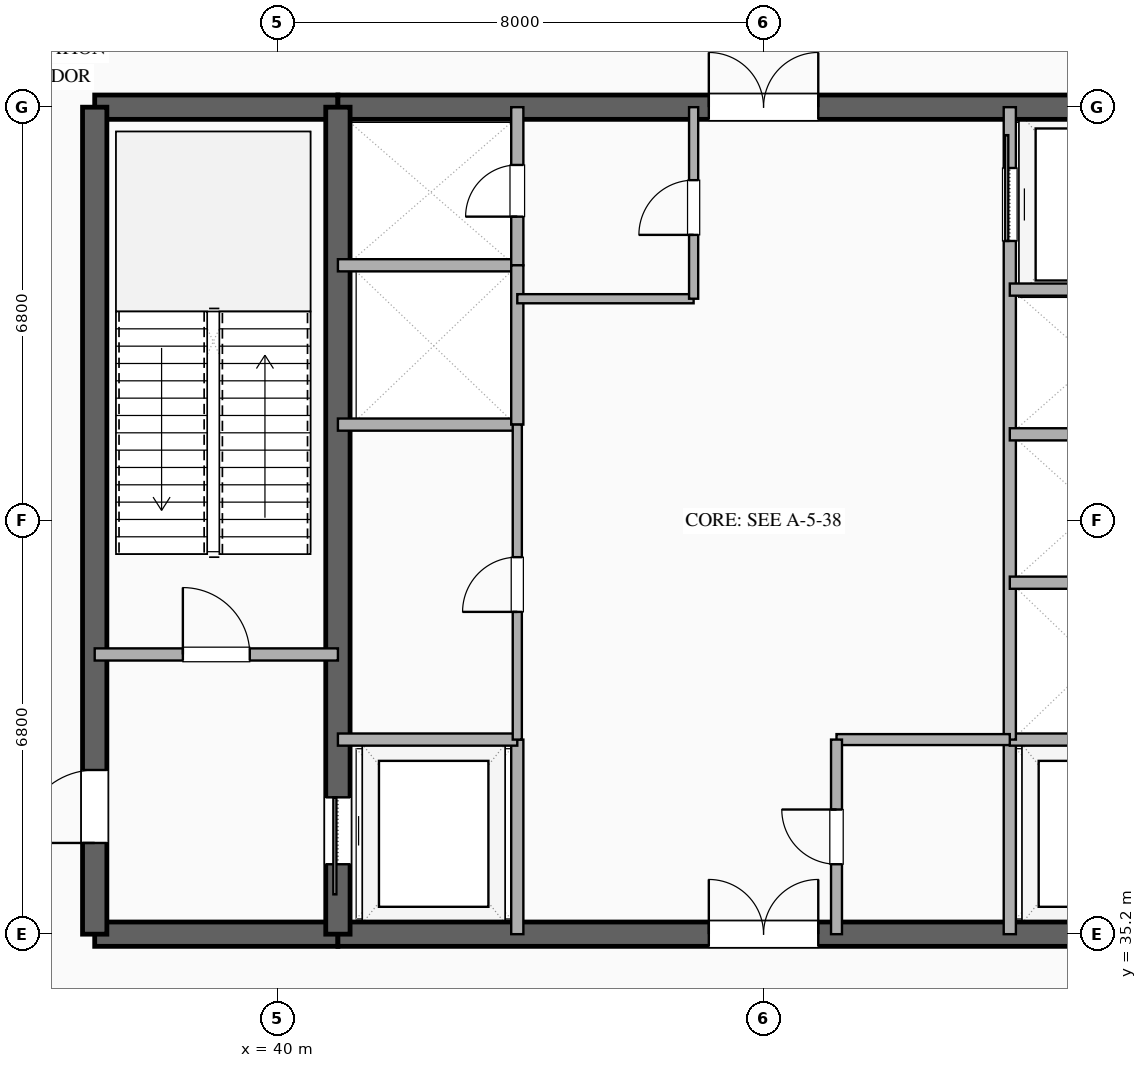
"""IFC4 building model, lengths in metres.
Left out: names, types, materials, properties, quantities, classifications, styles, units other than length and angle.
Written with IfcOpenShell. Run it as: python <this file> out.ifc"""

import sys

from ifc_helpers import new_model, si_unit, direction, frame, frame_2d, origin, place, context, subcontext, project, spatial, rectangle, extrude, element, fill, save


model = new_model("IFC4")
c1 = context("Model", 3, precision=1e-05, world=origin(), true_north=direction((0.0, 1.0)))
c2 = subcontext(c1, "Body", "Model", "MODEL_VIEW")
j1 = project(units=[si_unit("LENGTHUNIT", "METRE"), si_unit("PLANEANGLEUNIT", "RADIAN")], contexts=[c1])
p1 = place(None, origin())
s1 = spatial("IfcSite", under=j1, at=p1, CompositionType="ELEMENT")
p2 = place(p1, origin())
s2 = spatial("IfcBuilding", under=s1, at=p2, CompositionType="ELEMENT")
p3 = place(p2, frame((0.0, 0.0, 256.8)))
s3 = spatial("IfcBuildingStorey", under=s2, at=p3, CompositionType="ELEMENT", Elevation=256.8)
p4 = place(p3, frame((37.0, 35.2, 0.0), z_axis=(0.0, 0.0, 1.0), x_axis=(1.0, 0.0, 0.0)))
e1 = element("IfcWall", 1, at=p4, inside=s3, PredefinedType="SHEAR", context=c2, shape_type="SweptSolid", body=[
    extrude(rectangle(XDim=4.0, YDim=0.4, at=frame_2d((2.0, 0.0))), origin(), (0.0, 0.0, 1.0), 5.17),
])
p5 = place(p3, frame((41.0, 35.2, 0.0), z_axis=(0.0, 0.0, 1.0), x_axis=(1.0, 0.0, 0.0)))
e2 = element("IfcWall", 2, at=p5, inside=s3, PredefinedType="SHEAR", context=c2, shape_type="SweptSolid", body=[
    extrude(rectangle(XDim=14.0, YDim=0.4, at=frame_2d((7.0, 0.0))), origin(), (0.0, 0.0, 1.0), 5.17),
])
p6 = place(p5, frame((6.1, 0.0, 0.0)))
e3 = element("IfcOpeningElement", 3, at=p6, cuts=e2, PredefinedType="OPENING", context=c2, shape_type="SweptSolid", body=[
    extrude(rectangle(XDim=1.8, YDim=2.25, at=frame_2d((0.9, 1.125))), frame((0.0, 0.21, 0.0), z_axis=(0.0, -1.0, 0.0), x_axis=(1.0, 0.0, 0.0)), (0.0, 0.0, 1.0), 0.42),
])
p7 = place(p3, frame((37.0, 48.8, 0.0), z_axis=(0.0, 0.0, 1.0), x_axis=(1.0, 0.0, 0.0)))
e4 = element("IfcWall", 4, at=p7, inside=s3, PredefinedType="SHEAR", context=c2, shape_type="SweptSolid", body=[
    extrude(rectangle(XDim=4.0, YDim=0.4, at=frame_2d((2.0, 0.0))), origin(), (0.0, 0.0, 1.0), 5.17),
])
p8 = place(p3, frame((41.0, 48.8, 0.0), z_axis=(0.0, 0.0, 1.0), x_axis=(1.0, 0.0, 0.0)))
e5 = element("IfcWall", 5, at=p8, inside=s3, PredefinedType="SHEAR", context=c2, shape_type="SweptSolid", body=[
    extrude(rectangle(XDim=14.0, YDim=0.4, at=frame_2d((7.0, 0.0))), origin(), (0.0, 0.0, 1.0), 5.17),
])
p9 = place(p8, frame((6.1, 0.0, 0.0)))
e6 = element("IfcOpeningElement", 6, at=p9, cuts=e5, PredefinedType="OPENING", context=c2, shape_type="SweptSolid", body=[
    extrude(rectangle(XDim=1.8, YDim=2.25, at=frame_2d((0.9, 1.125))), frame((0.0, 0.21, 0.0), z_axis=(0.0, -1.0, 0.0), x_axis=(1.0, 0.0, 0.0)), (0.0, 0.0, 1.0), 0.42),
])
p10 = place(p3, frame((37.0, 35.2, 0.0), z_axis=(0.0, 0.0, 1.0), x_axis=(0.0, 1.0, 0.0)))
e7 = element("IfcWall", 7, at=p10, inside=s3, PredefinedType="SHEAR", context=c2, shape_type="SweptSolid", body=[
    extrude(rectangle(XDim=13.6, YDim=0.4, at=frame_2d((6.8, 0.0))), origin(), (0.0, 0.0, 1.0), 5.17),
])
p11 = place(p10, frame((1.5, 0.0, 0.0)))
e8 = element("IfcOpeningElement", 8, at=p11, cuts=e7, PredefinedType="OPENING", context=c2, shape_type="SweptSolid", body=[
    extrude(rectangle(XDim=1.2, YDim=2.15, at=frame_2d((0.6, 1.075))), frame((0.0, 0.21, 0.0), z_axis=(0.0, -1.0, 0.0), x_axis=(1.0, 0.0, 0.0)), (0.0, 0.0, 1.0), 0.42),
])
p12 = place(p3, frame((41.0, 35.2, 0.0), z_axis=(0.0, 0.0, 1.0), x_axis=(0.0, 1.0, 0.0)))
e9 = element("IfcWall", 9, at=p12, inside=s3, PredefinedType="SHEAR", context=c2, shape_type="SweptSolid", body=[
    extrude(rectangle(XDim=13.6, YDim=0.4, at=frame_2d((6.8, 0.0))), origin(), (0.0, 0.0, 1.0), 5.17),
])
p13 = place(p12, frame((1.15, 0.0, 0.0)))
e10 = element("IfcOpeningElement", 10, at=p13, cuts=e9, PredefinedType="OPENING", context=c2, shape_type="SweptSolid", body=[
    extrude(rectangle(XDim=1.1, YDim=2.2, at=frame_2d((0.55, 1.1))), frame((0.0, 0.21, 0.0), z_axis=(0.0, -1.0, 0.0), x_axis=(1.0, 0.0, 0.0)), (0.0, 0.0, 1.0), 0.42),
])
p14 = place(p3, frame((37.0, 39.8, 0.0), z_axis=(0.0, 0.0, 1.0), x_axis=(1.0, 0.0, 0.0)))
e11 = element("IfcWall", 11, at=p14, inside=s3, PredefinedType="SOLIDWALL", context=c2, shape_type="SweptSolid", body=[
    extrude(rectangle(XDim=4.0, YDim=0.2, at=frame_2d((2.0, 0.0))), origin(), (0.0, 0.0, 1.0), 3.47),
])
p15 = place(p14, frame((1.45, 0.0, 0.0)))
e12 = element("IfcOpeningElement", 12, at=p15, cuts=e11, PredefinedType="OPENING", context=c2, shape_type="SweptSolid", body=[
    extrude(rectangle(XDim=1.1, YDim=2.15, at=frame_2d((0.55, 1.075))), frame((0.0, 0.11, 0.0), z_axis=(0.0, -1.0, 0.0), x_axis=(1.0, 0.0, 0.0)), (0.0, 0.0, 1.0), 0.22),
])
p16 = place(p3, frame((43.95, 35.2, 0.0), z_axis=(0.0, 0.0, 1.0), x_axis=(0.0, 1.0, 0.0)))
e13 = element("IfcWall", 13, at=p16, inside=s3, PredefinedType="SOLIDWALL", context=c2, shape_type="SweptSolid", body=[
    extrude(rectangle(XDim=3.2, YDim=0.2, at=frame_2d((1.6, 0.0))), origin(), (0.0, 0.0, 1.0), 3.47),
])
p17 = place(p3, frame((41.0, 38.4, 0.0), z_axis=(0.0, 0.0, 1.0), x_axis=(1.0, 0.0, 0.0)))
e14 = element("IfcWall", 14, at=p17, inside=s3, PredefinedType="SOLIDWALL", context=c2, shape_type="SweptSolid", body=[
    extrude(rectangle(XDim=2.95, YDim=0.2, at=frame_2d((1.475, 0.0))), origin(), (0.0, 0.0, 1.0), 3.47),
])
p18 = place(p3, frame((52.05, 35.2, 0.0), z_axis=(0.0, 0.0, 1.0), x_axis=(0.0, 1.0, 0.0)))
e15 = element("IfcWall", 15, at=p18, inside=s3, PredefinedType="SOLIDWALL", context=c2, shape_type="SweptSolid", body=[
    extrude(rectangle(XDim=3.2, YDim=0.2, at=frame_2d((1.6, 0.0))), origin(), (0.0, 0.0, 1.0), 3.47),
])
for number, where, z_axis, x_axis in (
    (16, (52.05, 38.4, 0.0), (0.0, 0.0, 1.0), (1.0, 0.0, 0.0)),
    (17, (41.0, 46.2, 0.0), (0.0, 0.0, 1.0), (1.0, 0.0, 0.0)),
):
    element("IfcWall", number, at=place(p3, frame(where, z_axis=z_axis, x_axis=x_axis)), inside=s3, PredefinedType="SOLIDWALL", context=c2, shape_type="SweptSolid", body=[
        extrude(rectangle(XDim=2.95, YDim=0.2, at=frame_2d((1.475, 0.0))), origin(), (0.0, 0.0, 1.0), 3.47),
    ])
p19 = place(p3, frame((43.95, 46.2, 0.0), z_axis=(0.0, 0.0, 1.0), x_axis=(0.0, 1.0, 0.0)))
e18 = element("IfcWall", 18, at=p19, inside=s3, PredefinedType="SOLIDWALL", context=c2, shape_type="SweptSolid", body=[
    extrude(rectangle(XDim=2.6, YDim=0.2, at=frame_2d((1.3, 0.0))), origin(), (0.0, 0.0, 1.0), 3.47),
])
p20 = place(p19, frame((0.8, 0.0, 0.0)))
e19 = element("IfcOpeningElement", 19, at=p20, cuts=e18, PredefinedType="OPENING", context=c2, shape_type="SweptSolid", body=[
    extrude(rectangle(XDim=0.85, YDim=2.15, at=frame_2d((0.425, 1.075))), frame((0.0, 0.11, 0.0), z_axis=(0.0, -1.0, 0.0), x_axis=(1.0, 0.0, 0.0)), (0.0, 0.0, 1.0), 0.22),
])
p21 = place(p3, frame((41.0, 43.58, 0.0), z_axis=(0.0, 0.0, 1.0), x_axis=(1.0, 0.0, 0.0)))
e20 = element("IfcWall", 20, at=p21, inside=s3, PredefinedType="SOLIDWALL", context=c2, shape_type="SweptSolid", body=[
    extrude(rectangle(XDim=2.95, YDim=0.2, at=frame_2d((1.475, 0.0))), origin(), (0.0, 0.0, 1.0), 3.47),
])
p22 = place(p3, frame((43.95, 43.58, 0.0), z_axis=(0.0, 0.0, 1.0), x_axis=(0.0, 1.0, 0.0)))
e21 = element("IfcWall", 21, at=p22, inside=s3, PredefinedType="SOLIDWALL", context=c2, shape_type="SweptSolid", body=[
    extrude(rectangle(XDim=2.62, YDim=0.2, at=frame_2d((1.31, 0.0))), origin(), (0.0, 0.0, 1.0), 3.47),
])
p23 = place(p3, frame((43.95, 38.4, 0.0), z_axis=(0.0, 0.0, 1.0), x_axis=(0.0, 1.0, 0.0)))
e22 = element("IfcWall", 22, at=p23, inside=s3, PredefinedType="PARTITIONING", context=c2, shape_type="SweptSolid", body=[
    extrude(rectangle(XDim=5.18, YDim=0.15, at=frame_2d((2.59, 0.0))), origin(), (0.0, 0.0, 1.0), 3.47),
])
p24 = place(p23, frame((2.1, 0.0, 0.0)))
e23 = element("IfcOpeningElement", 23, at=p24, cuts=e22, PredefinedType="OPENING", context=c2, shape_type="SweptSolid", body=[
    extrude(rectangle(XDim=0.9, YDim=2.15, at=frame_2d((0.45, 1.075))), frame((0.0, 0.085, 0.0), z_axis=(0.0, -1.0, 0.0), x_axis=(1.0, 0.0, 0.0)), (0.0, 0.0, 1.0), 0.17),
])
p25 = place(p3, frame((52.05, 38.4, 0.0), z_axis=(0.0, 0.0, 1.0), x_axis=(0.0, 1.0, 0.0)))
e24 = element("IfcWall", 24, at=p25, inside=s3, PredefinedType="SOLIDWALL", context=c2, shape_type="SweptSolid", body=[
    extrude(rectangle(XDim=10.4, YDim=0.2, at=frame_2d((5.2, 0.0))), origin(), (0.0, 0.0, 1.0), 3.47),
])
p26 = place(p25, frame((8.2, 0.0, 0.0)))
e25 = element("IfcOpeningElement", 25, at=p26, cuts=e24, PredefinedType="OPENING", context=c2, shape_type="SweptSolid", body=[
    extrude(rectangle(XDim=1.2, YDim=2.2, at=frame_2d((0.6, 1.1))), frame((0.0, 0.11, 0.0), z_axis=(0.0, -1.0, 0.0), x_axis=(1.0, 0.0, 0.0)), (0.0, 0.0, 1.0), 0.22),
])
for number, where, z_axis, x_axis in (
    (26, (52.05, 40.98, 0.0), (0.0, 0.0, 1.0), (1.0, 0.0, 0.0)),
    (27, (52.05, 43.42, 0.0), (0.0, 0.0, 1.0), (1.0, 0.0, 0.0)),
    (28, (52.05, 45.8, 0.0), (0.0, 0.0, 1.0), (1.0, 0.0, 0.0)),
):
    element("IfcWall", number, at=place(p3, frame(where, z_axis=z_axis, x_axis=x_axis)), inside=s3, PredefinedType="SOLIDWALL", context=c2, shape_type="SweptSolid", body=[
        extrude(rectangle(XDim=2.95, YDim=0.2, at=frame_2d((1.475, 0.0))), origin(), (0.0, 0.0, 1.0), 3.47),
    ])
p27 = place(p3, frame((43.95, 45.65, 0.0), z_axis=(0.0, 0.0, 1.0), x_axis=(1.0, 0.0, 0.0)))
e29 = element("IfcWall", 29, at=p27, inside=s3, PredefinedType="PARTITIONING", context=c2, shape_type="SweptSolid", body=[
    extrude(rectangle(XDim=2.9, YDim=0.15, at=frame_2d((1.45, 0.0))), origin(), (0.0, 0.0, 1.0), 3.47),
])
p28 = place(p3, frame((46.85, 45.65, 0.0), z_axis=(0.0, 0.0, 1.0), x_axis=(0.0, 1.0, 0.0)))
e30 = element("IfcWall", 30, at=p28, inside=s3, PredefinedType="PARTITIONING", context=c2, shape_type="SweptSolid", body=[
    extrude(rectangle(XDim=3.15, YDim=0.15, at=frame_2d((1.575, 0.0))), origin(), (0.0, 0.0, 1.0), 3.47),
])
p29 = place(p28, frame((1.05, 0.0, 0.0)))
e31 = element("IfcOpeningElement", 31, at=p29, cuts=e30, PredefinedType="OPENING", context=c2, shape_type="SweptSolid", body=[
    extrude(rectangle(XDim=0.9, YDim=2.15, at=frame_2d((0.45, 1.075))), frame((0.0, 0.085, 0.0), z_axis=(0.0, -1.0, 0.0), x_axis=(1.0, 0.0, 0.0)), (0.0, 0.0, 1.0), 0.17),
])
p30 = place(p3, frame((49.2, 38.4, 0.0), z_axis=(0.0, 0.0, 1.0), x_axis=(1.0, 0.0, 0.0)))
e32 = element("IfcWall", 32, at=p30, inside=s3, PredefinedType="PLUMBINGWALL", context=c2, shape_type="SweptSolid", body=[
    extrude(rectangle(XDim=2.85, YDim=0.18, at=frame_2d((1.425, 0.0))), origin(), (0.0, 0.0, 1.0), 3.47),
])
p31 = place(p3, frame((49.2, 35.2, 0.0), z_axis=(0.0, 0.0, 1.0), x_axis=(0.0, 1.0, 0.0)))
e33 = element("IfcWall", 33, at=p31, inside=s3, PredefinedType="PLUMBINGWALL", context=c2, shape_type="SweptSolid", body=[
    extrude(rectangle(XDim=3.2, YDim=0.18, at=frame_2d((1.6, 0.0))), origin(), (0.0, 0.0, 1.0), 3.47),
])
p32 = place(p31, frame((1.15, 0.0, 0.0)))
e34 = element("IfcOpeningElement", 34, at=p32, cuts=e33, PredefinedType="OPENING", context=c2, shape_type="SweptSolid", body=[
    extrude(rectangle(XDim=0.9, YDim=2.1, at=frame_2d((0.45, 1.05))), frame((0.0, 0.1, 0.0), z_axis=(0.0, -1.0, 0.0), x_axis=(1.0, 0.0, 0.0)), (0.0, 0.0, 1.0), 0.2),
])
p33 = place(p13, origin())
e35 = element("IfcDoor", 35, at=p33, inside=s3, OperationType="SLIDING_TO_LEFT", PredefinedType="DOOR", context=c2, shape_type="SweptSolid", body=[
    extrude(rectangle(XDim=1.1, YDim=2.2, at=frame_2d((0.55, 1.1))), frame((0.0, 0.025, 0.0), z_axis=(0.0, -1.0, 0.0), x_axis=(1.0, 0.0, 0.0)), (0.0, 0.0, 1.0), 0.05),
])
fill(e10, e35)
p34 = place(p11, origin())
e36 = element("IfcDoor", 36, at=p34, inside=s3, OperationType="SINGLE_SWING_LEFT", PredefinedType="DOOR", context=c2, shape_type="SweptSolid", body=[
    extrude(rectangle(XDim=1.2, YDim=2.15, at=frame_2d((0.6, 1.075))), frame((0.0, 0.025, 0.0), z_axis=(0.0, -1.0, 0.0), x_axis=(1.0, 0.0, 0.0)), (0.0, 0.0, 1.0), 0.05),
])
fill(e8, e36)
p35 = place(p6, origin())
e37 = element("IfcDoor", 37, at=p35, inside=s3, OperationType="DOUBLE_DOOR_SINGLE_SWING", PredefinedType="DOOR", context=c2, shape_type="SweptSolid", body=[
    extrude(rectangle(XDim=1.8, YDim=2.25, at=frame_2d((0.9, 1.125))), frame((0.0, 0.025, 0.0), z_axis=(0.0, -1.0, 0.0), x_axis=(1.0, 0.0, 0.0)), (0.0, 0.0, 1.0), 0.05),
])
fill(e3, e37)
p36 = place(p9, origin())
e38 = element("IfcDoor", 38, at=p36, inside=s3, OperationType="DOUBLE_DOOR_SINGLE_SWING", PredefinedType="DOOR", context=c2, shape_type="SweptSolid", body=[
    extrude(rectangle(XDim=1.8, YDim=2.25, at=frame_2d((0.9, 1.125))), frame((0.0, 0.025, 0.0), z_axis=(0.0, -1.0, 0.0), x_axis=(1.0, 0.0, 0.0)), (0.0, 0.0, 1.0), 0.05),
])
fill(e6, e38)
p37 = place(p15, origin())
e39 = element("IfcDoor", 39, at=p37, inside=s3, OperationType="SINGLE_SWING_LEFT", PredefinedType="DOOR", context=c2, shape_type="SweptSolid", body=[
    extrude(rectangle(XDim=1.1, YDim=2.15, at=frame_2d((0.55, 1.075))), frame((0.0, 0.025, 0.0), z_axis=(0.0, -1.0, 0.0), x_axis=(1.0, 0.0, 0.0)), (0.0, 0.0, 1.0), 0.05),
])
fill(e12, e39)
p38 = place(p20, origin())
e40 = element("IfcDoor", 40, at=p38, inside=s3, OperationType="SINGLE_SWING_LEFT", PredefinedType="DOOR", context=c2, shape_type="SweptSolid", body=[
    extrude(rectangle(XDim=0.85, YDim=2.15, at=frame_2d((0.425, 1.075))), frame((0.0, 0.025, 0.0), z_axis=(0.0, -1.0, 0.0), x_axis=(1.0, 0.0, 0.0)), (0.0, 0.0, 1.0), 0.05),
])
fill(e19, e40)
p39 = place(p24, origin())
e41 = element("IfcDoor", 41, at=p39, inside=s3, OperationType="SINGLE_SWING_LEFT", PredefinedType="DOOR", context=c2, shape_type="SweptSolid", body=[
    extrude(rectangle(XDim=0.9, YDim=2.15, at=frame_2d((0.45, 1.075))), frame((0.0, 0.025, 0.0), z_axis=(0.0, -1.0, 0.0), x_axis=(1.0, 0.0, 0.0)), (0.0, 0.0, 1.0), 0.05),
])
fill(e23, e41)
p40 = place(p26, origin())
e42 = element("IfcDoor", 42, at=p40, inside=s3, OperationType="SLIDING_TO_RIGHT", PredefinedType="DOOR", context=c2, shape_type="SweptSolid", body=[
    extrude(rectangle(XDim=1.2, YDim=2.2, at=frame_2d((0.6, 1.1))), frame((0.0, 0.025, 0.0), z_axis=(0.0, -1.0, 0.0), x_axis=(1.0, 0.0, 0.0)), (0.0, 0.0, 1.0), 0.05),
])
fill(e25, e42)
p41 = place(p29, origin())
e43 = element("IfcDoor", 43, at=p41, inside=s3, OperationType="SINGLE_SWING_LEFT", PredefinedType="DOOR", context=c2, shape_type="SweptSolid", body=[
    extrude(rectangle(XDim=0.9, YDim=2.15, at=frame_2d((0.45, 1.075))), frame((0.0, 0.025, 0.0), z_axis=(0.0, -1.0, 0.0), x_axis=(1.0, 0.0, 0.0)), (0.0, 0.0, 1.0), 0.05),
])
fill(e31, e43)
p42 = place(p32, origin())
e44 = element("IfcDoor", 44, at=p42, inside=s3, OperationType="SINGLE_SWING_RIGHT", PredefinedType="DOOR", context=c2, shape_type="SweptSolid", body=[
    extrude(rectangle(XDim=0.9, YDim=2.1, at=frame_2d((0.45, 1.05))), frame((0.0, 0.025, 0.0), z_axis=(0.0, -1.0, 0.0), x_axis=(1.0, 0.0, 0.0)), (0.0, 0.0, 1.0), 0.05),
])
fill(e34, e44)
save(model, sys.argv[1])
